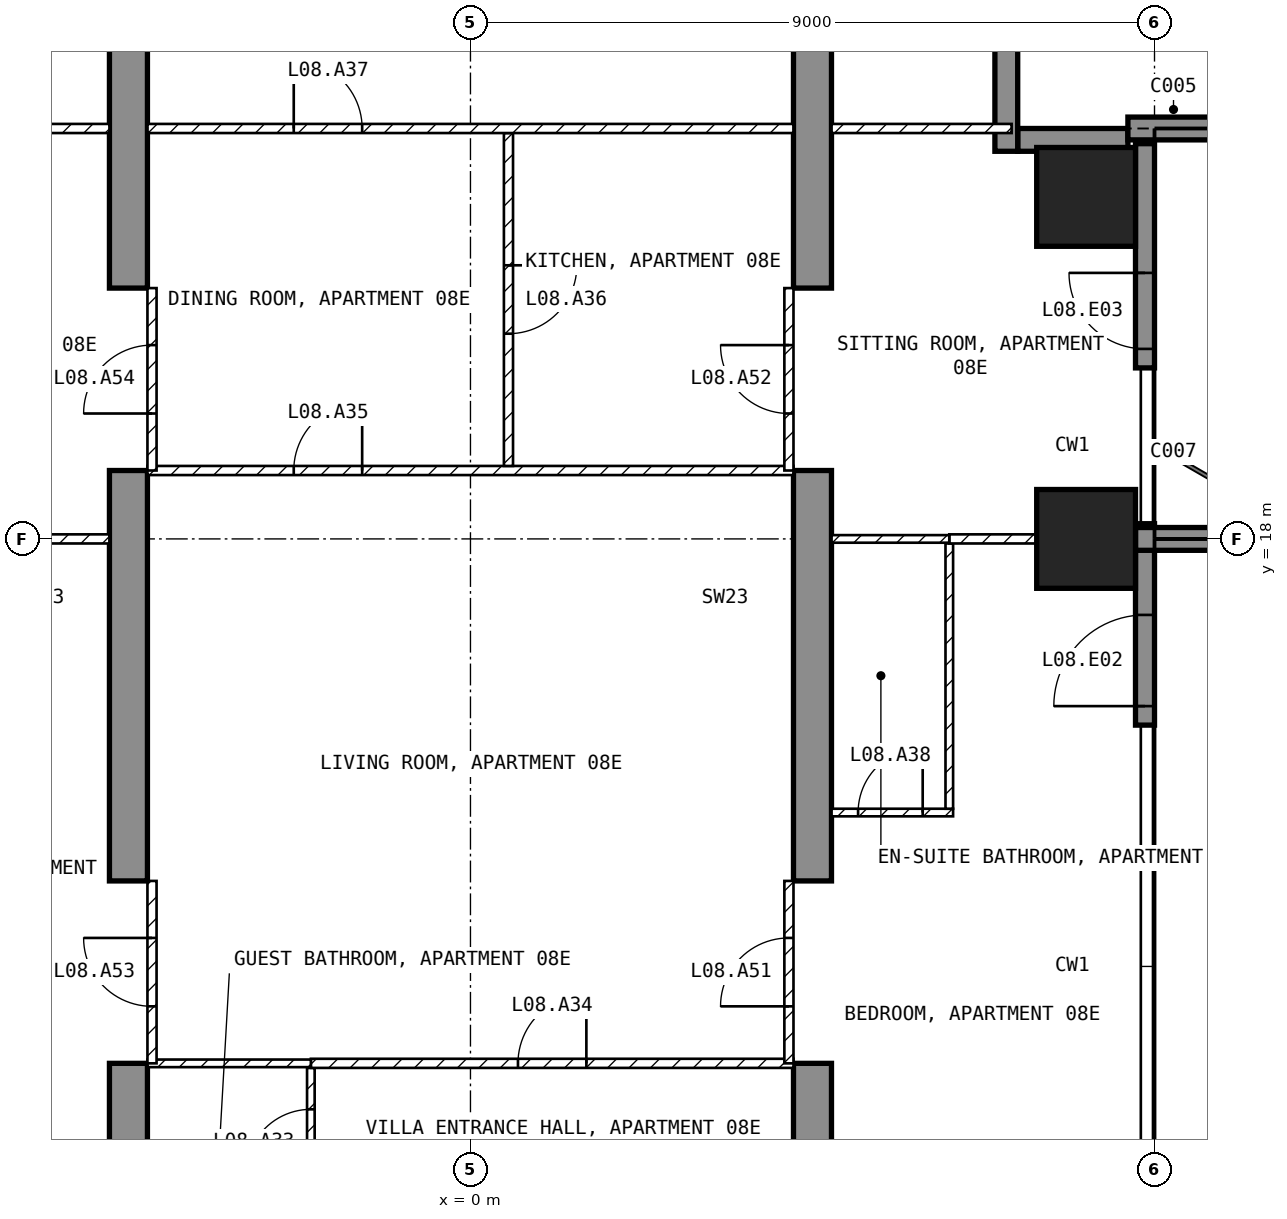
"""IFC4 building model, lengths in metres.
Left out: names, types, materials, properties, quantities, classifications, styles, units other than length and angle.
Written with IfcOpenShell. Run it as: python <this file> out.ifc"""

import sys

from ifc_helpers import new_model, si_unit, direction, frame, frame_2d, origin, origin_2d, place, context, subcontext, project, spatial, polyline, rectangle, outline, extrude, element, fill, save


model = new_model("IFC4")
c1 = context("Model", 3, precision=1e-05, world=origin(), true_north=direction((0.0, 1.0)))
c2 = subcontext(c1, "Body", "Model", "MODEL_VIEW")
j1 = project(units=[si_unit("LENGTHUNIT", "METRE"), si_unit("PLANEANGLEUNIT", "RADIAN")], contexts=[c1])
p1 = place(None, origin())
s1 = spatial("IfcSite", under=j1, at=p1, CompositionType="ELEMENT")
p2 = place(p1, origin())
s2 = spatial("IfcBuilding", under=s1, at=p2, CompositionType="ELEMENT")
p3 = place(p2, frame((0.0, 0.0, 47.0)))
s3 = spatial("IfcBuildingStorey", under=s2, at=p3, CompositionType="ELEMENT", Elevation=47.0)
for number, where, z_axis, x_axis in (
    (1, (8.1, 18.0, -0.25), (0.0, 0.0, 1.0), (1.0, 0.0, 0.0)),
    (2, (8.1, 22.5, -0.25), (0.0, 0.0, 1.0), (1.0, 0.0, 0.0)),
):
    element("IfcColumn", number, at=place(p3, frame(where, z_axis=z_axis, x_axis=x_axis)), inside=s3, PredefinedType="COLUMN", context=c2, shape_type="SweptSolid", body=[
        extrude(rectangle(XDim=1.3, YDim=1.3, at=origin_2d()), origin(), (0.0, 0.0, 1.0), 3.5),
    ])
for number, where, z_axis, x_axis in (
    (3, (-4.75, 9.0, -0.25), (1.0, 0.0, 0.0), (0.0, 1.0, 0.0)),
    (4, (4.25, 9.0, -0.25), (1.0, 0.0, 0.0), (0.0, 1.0, 0.0)),
):
    element("IfcWall", number, at=place(p3, frame(where, z_axis=z_axis, x_axis=x_axis)), inside=s3, PredefinedType="SHEAR", context=c2, shape_type="SweptSolid", body=[
        extrude(outline(polyline([(0.0, 0.0), (2.1, 0.0), (2.1, 2.65), (4.5, 2.65), (4.5, 0.0), (9.9, 0.0), (9.9, 2.65), (12.3, 2.65), (12.3, 0.0), (16.45, 0.0), (16.45, 3.5), (0.0, 3.5), (0.0, 0.0)])), origin(), (0.0, 0.0, 1.0), 0.5),
    ])
p4 = place(p3, frame((8.875, 15.55, 0.0), z_axis=(0.0, 0.0, 1.0), x_axis=(0.0, 1.0, 0.0)))
e5 = element("IfcWall", 5, at=p4, inside=s3, PredefinedType="SOLIDWALL", context=c2, shape_type="SweptSolid", body=[
    extrude(rectangle(XDim=2.65, YDim=0.25, at=frame_2d((1.325, 0.0))), origin(), (0.0, 0.0, 1.0), 3.25),
])
p5 = place(p4, frame((0.25, 0.0, 0.0)))
e6 = element("IfcOpeningElement", 6, at=p5, cuts=e5, PredefinedType="OPENING", context=c2, shape_type="SweptSolid", body=[
    extrude(rectangle(XDim=1.2, YDim=2.4, at=frame_2d((0.6, 1.2))), frame((0.0, 0.135, 0.0), z_axis=(0.0, -1.0, 0.0), x_axis=(1.0, 0.0, 0.0)), (0.0, 0.0, 1.0), 0.27),
])
p6 = place(p3, frame((8.875, 20.25, 0.0), z_axis=(0.0, 0.0, 1.0), x_axis=(0.0, 1.0, 0.0)))
e7 = element("IfcWall", 7, at=p6, inside=s3, PredefinedType="SOLIDWALL", context=c2, shape_type="SweptSolid", body=[
    extrude(rectangle(XDim=2.95, YDim=0.25, at=frame_2d((1.475, 0.0))), origin(), (0.0, 0.0, 1.0), 3.25),
])
p7 = place(p6, frame((0.25, 0.0, 0.0)))
e8 = element("IfcOpeningElement", 8, at=p7, cuts=e7, PredefinedType="OPENING", context=c2, shape_type="SweptSolid", body=[
    extrude(rectangle(XDim=1.0, YDim=2.4, at=frame_2d((0.5, 1.2))), frame((0.0, 0.135, 0.0), z_axis=(0.0, -1.0, 0.0), x_axis=(1.0, 0.0, 0.0)), (0.0, 0.0, 1.0), 0.27),
])
p8 = place(p3, frame((8.65, 23.25, 0.0), z_axis=(0.0, 0.0, 1.0), x_axis=(-1.0, 0.0, 0.0)))
e9 = element("IfcWall", 9, at=p8, inside=s3, PredefinedType="SOLIDWALL", context=c2, shape_type="SweptSolid", body=[
    extrude(rectangle(XDim=1.45, YDim=0.3, at=frame_2d((0.725, 0.0))), origin(), (0.0, 0.0, 1.0), 3.25),
])
p9 = place(p3, frame((7.05, 23.1, 0.0), z_axis=(0.0, 0.0, 1.0), x_axis=(0.0, 1.0, 0.0)))
e10 = element("IfcWall", 10, at=p9, inside=s3, PredefinedType="SOLIDWALL", context=c2, shape_type="SweptSolid", body=[
    extrude(rectangle(XDim=1.8, YDim=0.3, at=frame_2d((0.9, 0.0))), origin(), (0.0, 0.0, 1.0), 3.25),
])
p10 = place(p3, frame((8.75, 18.0, 0.0), z_axis=(0.0, 0.0, 1.0), x_axis=(1.0, 0.0, 0.0)))
e11 = element("IfcWall", 11, at=p10, inside=s3, PredefinedType="SOLIDWALL", context=c2, shape_type="SweptSolid", body=[
    extrude(rectangle(XDim=2.95, YDim=0.3, at=frame_2d((1.475, 0.0))), origin(), (0.0, 0.0, 1.0), 3.25),
])
p11 = place(p3, frame((8.65, 23.4, 0.0), z_axis=(0.0, 0.0, 1.0), x_axis=(1.0, 0.0, 0.0)))
e12 = element("IfcWall", 12, at=p11, inside=s3, PredefinedType="SOLIDWALL", context=c2, shape_type="SweptSolid", body=[
    extrude(rectangle(XDim=3.05, YDim=0.3, at=frame_2d((1.525, 0.0))), origin(), (0.0, 0.0, 1.0), 3.25),
])
p12 = place(p3, frame((-2.1, 9.1, 0.0), z_axis=(0.0, 0.0, 1.0), x_axis=(0.0, 1.0, 0.0)))
e13 = element("IfcWall", 13, at=p12, inside=s3, PredefinedType="PARTITIONING", context=c2, shape_type="SweptSolid", body=[
    extrude(rectangle(XDim=1.94, YDim=0.1, at=frame_2d((0.97, 0.0))), origin(), (0.0, 0.0, 1.0), 3.25),
])
p13 = place(p12, frame((0.545, 0.0, 0.0)))
e14 = element("IfcOpeningElement", 14, at=p13, cuts=e13, PredefinedType="OPENING", context=c2, shape_type="SweptSolid", body=[
    extrude(rectangle(XDim=0.85, YDim=2.1, at=frame_2d((0.425, 1.05))), frame((0.0, 0.06, 0.0), z_axis=(0.0, -1.0, 0.0), x_axis=(1.0, 0.0, 0.0)), (0.0, 0.0, 1.0), 0.12),
])
p14 = place(p3, frame((-2.1, 11.1, 0.0), z_axis=(0.0, 0.0, 1.0), x_axis=(1.0, 0.0, 0.0)))
e15 = element("IfcWall", 15, at=p14, inside=s3, PredefinedType="PARTITIONING", context=c2, shape_type="SweptSolid", body=[
    extrude(rectangle(XDim=6.35, YDim=0.12, at=frame_2d((3.175, 0.0))), origin(), (0.0, 0.0, 1.0), 3.25),
])
p15 = place(p14, frame((2.725, 0.0, 0.0)))
e16 = element("IfcOpeningElement", 16, at=p15, cuts=e15, PredefinedType="OPENING", context=c2, shape_type="SweptSolid", body=[
    extrude(rectangle(XDim=0.9, YDim=2.1, at=frame_2d((0.45, 1.05))), frame((0.0, 0.07, 0.0), z_axis=(0.0, -1.0, 0.0), x_axis=(1.0, 0.0, 0.0)), (0.0, 0.0, 1.0), 0.14),
])
p16 = place(p3, frame((-4.25, 11.1, 0.0), z_axis=(0.0, 0.0, 1.0), x_axis=(1.0, 0.0, 0.0)))
e17 = element("IfcWall", 17, at=p16, inside=s3, PredefinedType="PARTITIONING", context=c2, shape_type="SweptSolid", body=[
    extrude(rectangle(XDim=2.15, YDim=0.1, at=frame_2d((1.075, 0.0))), origin(), (0.0, 0.0, 1.0), 3.25),
])
p17 = place(p3, frame((-4.25, 18.9, 0.0), z_axis=(0.0, 0.0, 1.0), x_axis=(1.0, 0.0, 0.0)))
e18 = element("IfcWall", 18, at=p17, inside=s3, PredefinedType="PARTITIONING", context=c2, shape_type="SweptSolid", body=[
    extrude(rectangle(XDim=8.5, YDim=0.12, at=frame_2d((4.25, 0.0))), origin(), (0.0, 0.0, 1.0), 3.25),
])
p18 = place(p17, frame((1.925, 0.0, 0.0)))
e19 = element("IfcOpeningElement", 19, at=p18, cuts=e18, PredefinedType="OPENING", context=c2, shape_type="SweptSolid", body=[
    extrude(rectangle(XDim=0.9, YDim=2.1, at=frame_2d((0.45, 1.05))), frame((0.0, 0.07, 0.0), z_axis=(0.0, -1.0, 0.0), x_axis=(1.0, 0.0, 0.0)), (0.0, 0.0, 1.0), 0.14),
])
p19 = place(p3, frame((0.5, 23.34, 0.0), z_axis=(0.0, 0.0, 1.0), x_axis=(0.0, -1.0, 0.0)))
e20 = element("IfcWall", 20, at=p19, inside=s3, PredefinedType="PARTITIONING", context=c2, shape_type="SweptSolid", body=[
    extrude(rectangle(XDim=4.38, YDim=0.12, at=frame_2d((2.19, 0.0))), origin(), (0.0, 0.0, 1.0), 3.25),
])
p20 = place(p19, frame((1.74, 0.0, 0.0)))
e21 = element("IfcOpeningElement", 21, at=p20, cuts=e20, PredefinedType="OPENING", context=c2, shape_type="SweptSolid", body=[
    extrude(rectangle(XDim=0.9, YDim=2.1, at=frame_2d((0.45, 1.05))), frame((0.0, 0.07, 0.0), z_axis=(0.0, -1.0, 0.0), x_axis=(1.0, 0.0, 0.0)), (0.0, 0.0, 1.0), 0.14),
])
p21 = place(p3, frame((-4.25, 23.4, 0.0), z_axis=(0.0, 0.0, 1.0), x_axis=(1.0, 0.0, 0.0)))
e22 = element("IfcWall", 22, at=p21, inside=s3, PredefinedType="PARTITIONING", context=c2, shape_type="SweptSolid", body=[
    extrude(rectangle(XDim=8.5, YDim=0.12, at=frame_2d((4.25, 0.0))), origin(), (0.0, 0.0, 1.0), 3.25),
])
p22 = place(p21, frame((1.925, 0.0, 0.0)))
e23 = element("IfcOpeningElement", 23, at=p22, cuts=e22, PredefinedType="OPENING", context=c2, shape_type="SweptSolid", body=[
    extrude(rectangle(XDim=0.9, YDim=2.1, at=frame_2d((0.45, 1.05))), frame((0.0, 0.07, 0.0), z_axis=(0.0, -1.0, 0.0), x_axis=(1.0, 0.0, 0.0)), (0.0, 0.0, 1.0), 0.14),
])
p23 = place(p3, frame((4.75, 14.4, 0.0), z_axis=(0.0, 0.0, 1.0), x_axis=(1.0, 0.0, 0.0)))
e24 = element("IfcWall", 24, at=p23, inside=s3, PredefinedType="PARTITIONING", context=c2, shape_type="SweptSolid", body=[
    extrude(rectangle(XDim=1.6, YDim=0.1, at=frame_2d((0.8, 0.0))), origin(), (0.0, 0.0, 1.0), 3.25),
])
p24 = place(p23, frame((0.35, 0.0, 0.0)))
e25 = element("IfcOpeningElement", 25, at=p24, cuts=e24, PredefinedType="OPENING", context=c2, shape_type="SweptSolid", body=[
    extrude(rectangle(XDim=0.85, YDim=2.1, at=frame_2d((0.425, 1.05))), frame((0.0, 0.06, 0.0), z_axis=(0.0, -1.0, 0.0), x_axis=(1.0, 0.0, 0.0)), (0.0, 0.0, 1.0), 0.12),
])
p25 = place(p3, frame((6.3, 14.45, 0.0), z_axis=(0.0, 0.0, 1.0), x_axis=(0.0, 1.0, 0.0)))
e26 = element("IfcWall", 26, at=p25, inside=s3, PredefinedType="PARTITIONING", context=c2, shape_type="SweptSolid", body=[
    extrude(rectangle(XDim=3.49, YDim=0.1, at=frame_2d((1.745, 0.0))), origin(), (0.0, 0.0, 1.0), 3.25),
])
p26 = place(p3, frame((6.3, 18.0, 0.0), z_axis=(0.0, 0.0, 1.0), x_axis=(1.0, 0.0, 0.0)))
e27 = element("IfcWall", 27, at=p26, inside=s3, PredefinedType="PARTITIONING", context=c2, shape_type="SweptSolid", body=[
    extrude(rectangle(XDim=1.15, YDim=0.12, at=frame_2d((0.575, 0.0))), origin(), (0.0, 0.0, 1.0), 2.346),
])
p27 = place(p3, frame((4.75, 18.0, 0.0), z_axis=(0.0, 0.0, 1.0), x_axis=(1.0, 0.0, 0.0)))
e28 = element("IfcWall", 28, at=p27, inside=s3, PredefinedType="PARTITIONING", context=c2, shape_type="SweptSolid", body=[
    extrude(rectangle(XDim=1.55, YDim=0.1, at=frame_2d((0.775, 0.0))), origin(), (0.0, 0.0, 1.0), 2.346),
])
p28 = place(p3, frame((4.75, 23.4, 0.0), z_axis=(0.0, 0.0, 1.0), x_axis=(1.0, 0.0, 0.0)))
e29 = element("IfcWall", 29, at=p28, inside=s3, PredefinedType="PARTITIONING", context=c2, shape_type="SweptSolid", body=[
    extrude(rectangle(XDim=2.37, YDim=0.12, at=frame_2d((1.185, 0.0))), origin(), (0.0, 0.0, 1.0), 3.25),
])
p29 = place(p3, frame((-7.45, 18.0, 0.0), z_axis=(0.0, 0.0, 1.0), x_axis=(1.0, 0.0, 0.0)))
e30 = element("IfcWall", 30, at=p29, inside=s3, PredefinedType="PARTITIONING", context=c2, shape_type="SweptSolid", body=[
    extrude(rectangle(XDim=2.7, YDim=0.12, at=frame_2d((1.35, 0.0))), origin(), (0.0, 0.0, 1.0), 2.346),
])
p30 = place(p3, frame((-7.12, 23.4, 0.0), z_axis=(0.0, 0.0, 1.0), x_axis=(1.0, 0.0, 0.0)))
e31 = element("IfcWall", 31, at=p30, inside=s3, PredefinedType="PARTITIONING", context=c2, shape_type="SweptSolid", body=[
    extrude(rectangle(XDim=2.37, YDim=0.12, at=frame_2d((1.185, 0.0))), origin(), (0.0, 0.0, 1.0), 3.25),
])
p31 = place(p3, frame((4.19, 11.1, 0.0), z_axis=(0.0, 0.0, 1.0), x_axis=(0.0, 1.0, 0.0)))
e32 = element("IfcWall", 32, at=p31, inside=s3, PredefinedType="PARTITIONING", context=c2, shape_type="SweptSolid", body=[
    extrude(rectangle(XDim=2.4, YDim=0.12, at=frame_2d((1.2, 0.0))), origin(), (0.0, 0.0, 1.0), 2.4),
])
p32 = place(p31, frame((0.75, 0.0, 0.0)))
e33 = element("IfcOpeningElement", 33, at=p32, cuts=e32, PredefinedType="OPENING", context=c2, shape_type="SweptSolid", body=[
    extrude(rectangle(XDim=0.9, YDim=2.1, at=frame_2d((0.45, 1.05))), frame((0.0, 0.07, 0.0), z_axis=(0.0, -1.0, 0.0), x_axis=(1.0, 0.0, 0.0)), (0.0, 0.0, 1.0), 0.14),
])
p33 = place(p3, frame((4.19, 18.9, 0.0), z_axis=(0.0, 0.0, 1.0), x_axis=(0.0, 1.0, 0.0)))
e34 = element("IfcWall", 34, at=p33, inside=s3, PredefinedType="PARTITIONING", context=c2, shape_type="SweptSolid", body=[
    extrude(rectangle(XDim=2.4, YDim=0.12, at=frame_2d((1.2, 0.0))), origin(), (0.0, 0.0, 1.0), 2.4),
])
p34 = place(p33, frame((0.75, 0.0, 0.0)))
e35 = element("IfcOpeningElement", 35, at=p34, cuts=e34, PredefinedType="OPENING", context=c2, shape_type="SweptSolid", body=[
    extrude(rectangle(XDim=0.9, YDim=2.1, at=frame_2d((0.45, 1.05))), frame((0.0, 0.07, 0.0), z_axis=(0.0, -1.0, 0.0), x_axis=(1.0, 0.0, 0.0)), (0.0, 0.0, 1.0), 0.14),
])
p35 = place(p3, frame((-4.19, 11.1, 0.0), z_axis=(0.0, 0.0, 1.0), x_axis=(0.0, 1.0, 0.0)))
e36 = element("IfcWall", 36, at=p35, inside=s3, PredefinedType="PARTITIONING", context=c2, shape_type="SweptSolid", body=[
    extrude(rectangle(XDim=2.4, YDim=0.12, at=frame_2d((1.2, 0.0))), origin(), (0.0, 0.0, 1.0), 2.4),
])
p36 = place(p35, frame((0.75, 0.0, 0.0)))
e37 = element("IfcOpeningElement", 37, at=p36, cuts=e36, PredefinedType="OPENING", context=c2, shape_type="SweptSolid", body=[
    extrude(rectangle(XDim=0.9, YDim=2.1, at=frame_2d((0.45, 1.05))), frame((0.0, 0.07, 0.0), z_axis=(0.0, -1.0, 0.0), x_axis=(1.0, 0.0, 0.0)), (0.0, 0.0, 1.0), 0.14),
])
p37 = place(p3, frame((-4.19, 18.9, 0.0), z_axis=(0.0, 0.0, 1.0), x_axis=(0.0, 1.0, 0.0)))
e38 = element("IfcWall", 38, at=p37, inside=s3, PredefinedType="PARTITIONING", context=c2, shape_type="SweptSolid", body=[
    extrude(rectangle(XDim=2.4, YDim=0.12, at=frame_2d((1.2, 0.0))), origin(), (0.0, 0.0, 1.0), 2.4),
])
p38 = place(p37, frame((0.75, 0.0, 0.0)))
e39 = element("IfcOpeningElement", 39, at=p38, cuts=e38, PredefinedType="OPENING", context=c2, shape_type="SweptSolid", body=[
    extrude(rectangle(XDim=0.9, YDim=2.1, at=frame_2d((0.45, 1.05))), frame((0.0, 0.07, 0.0), z_axis=(0.0, -1.0, 0.0), x_axis=(1.0, 0.0, 0.0)), (0.0, 0.0, 1.0), 0.14),
])
p39 = place(p5, origin())
e40 = element("IfcDoor", 40, at=p39, inside=s3, OperationType="SINGLE_SWING_LEFT", PredefinedType="DOOR", context=c2, shape_type="SweptSolid", body=[
    extrude(rectangle(XDim=1.2, YDim=2.4, at=frame_2d((0.6, 1.2))), frame((0.0, 0.025, 0.0), z_axis=(0.0, -1.0, 0.0), x_axis=(1.0, 0.0, 0.0)), (0.0, 0.0, 1.0), 0.05),
])
fill(e6, e40)
p40 = place(p7, origin())
e41 = element("IfcDoor", 41, at=p40, inside=s3, OperationType="SINGLE_SWING_RIGHT", PredefinedType="DOOR", context=c2, shape_type="SweptSolid", body=[
    extrude(rectangle(XDim=1.0, YDim=2.4, at=frame_2d((0.5, 1.2))), frame((0.0, 0.025, 0.0), z_axis=(0.0, -1.0, 0.0), x_axis=(1.0, 0.0, 0.0)), (0.0, 0.0, 1.0), 0.05),
])
fill(e8, e41)
p41 = place(p13, origin())
e42 = element("IfcDoor", 42, at=p41, inside=s3, OperationType="SINGLE_SWING_LEFT", PredefinedType="DOOR", context=c2, shape_type="SweptSolid", body=[
    extrude(rectangle(XDim=0.85, YDim=2.1, at=frame_2d((0.425, 1.05))), frame((0.0, 0.025, 0.0), z_axis=(0.0, -1.0, 0.0), x_axis=(1.0, 0.0, 0.0)), (0.0, 0.0, 1.0), 0.05),
])
fill(e14, e42)
p42 = place(p15, origin())
e43 = element("IfcDoor", 43, at=p42, inside=s3, OperationType="SINGLE_SWING_RIGHT", PredefinedType="DOOR", context=c2, shape_type="SweptSolid", body=[
    extrude(rectangle(XDim=0.9, YDim=2.1, at=frame_2d((0.45, 1.05))), frame((0.0, 0.025, 0.0), z_axis=(0.0, -1.0, 0.0), x_axis=(1.0, 0.0, 0.0)), (0.0, 0.0, 1.0), 0.05),
])
fill(e16, e43)
p43 = place(p18, origin())
e44 = element("IfcDoor", 44, at=p43, inside=s3, OperationType="SINGLE_SWING_RIGHT", PredefinedType="DOOR", context=c2, shape_type="SweptSolid", body=[
    extrude(rectangle(XDim=0.9, YDim=2.1, at=frame_2d((0.45, 1.05))), frame((0.0, 0.025, 0.0), z_axis=(0.0, -1.0, 0.0), x_axis=(1.0, 0.0, 0.0)), (0.0, 0.0, 1.0), 0.05),
])
fill(e19, e44)
p44 = place(p20, origin())
e45 = element("IfcDoor", 45, at=p44, inside=s3, OperationType="SINGLE_SWING_LEFT", PredefinedType="DOOR", context=c2, shape_type="SweptSolid", body=[
    extrude(rectangle(XDim=0.9, YDim=2.1, at=frame_2d((0.45, 1.05))), frame((0.0, 0.025, 0.0), z_axis=(0.0, -1.0, 0.0), x_axis=(1.0, 0.0, 0.0)), (0.0, 0.0, 1.0), 0.05),
])
fill(e21, e45)
p45 = place(p22, origin())
e46 = element("IfcDoor", 46, at=p45, inside=s3, OperationType="SINGLE_SWING_LEFT", PredefinedType="DOOR", context=c2, shape_type="SweptSolid", body=[
    extrude(rectangle(XDim=0.9, YDim=2.1, at=frame_2d((0.45, 1.05))), frame((0.0, 0.025, 0.0), z_axis=(0.0, -1.0, 0.0), x_axis=(1.0, 0.0, 0.0)), (0.0, 0.0, 1.0), 0.05),
])
fill(e23, e46)
p46 = place(p24, origin())
e47 = element("IfcDoor", 47, at=p46, inside=s3, OperationType="SINGLE_SWING_RIGHT", PredefinedType="DOOR", context=c2, shape_type="SweptSolid", body=[
    extrude(rectangle(XDim=0.85, YDim=2.1, at=frame_2d((0.425, 1.05))), frame((0.0, 0.025, 0.0), z_axis=(0.0, -1.0, 0.0), x_axis=(1.0, 0.0, 0.0)), (0.0, 0.0, 1.0), 0.05),
])
fill(e25, e47)
p47 = place(p32, origin())
e48 = element("IfcDoor", 48, at=p47, inside=s3, OperationType="SINGLE_SWING_LEFT", PredefinedType="DOOR", context=c2, shape_type="SweptSolid", body=[
    extrude(rectangle(XDim=0.9, YDim=2.1, at=frame_2d((0.45, 1.05))), frame((0.0, 0.025, 0.0), z_axis=(0.0, -1.0, 0.0), x_axis=(1.0, 0.0, 0.0)), (0.0, 0.0, 1.0), 0.05),
])
fill(e33, e48)
p48 = place(p34, origin())
e49 = element("IfcDoor", 49, at=p48, inside=s3, OperationType="SINGLE_SWING_RIGHT", PredefinedType="DOOR", context=c2, shape_type="SweptSolid", body=[
    extrude(rectangle(XDim=0.9, YDim=2.1, at=frame_2d((0.45, 1.05))), frame((0.0, 0.025, 0.0), z_axis=(0.0, -1.0, 0.0), x_axis=(1.0, 0.0, 0.0)), (0.0, 0.0, 1.0), 0.05),
])
fill(e35, e49)
p49 = place(p36, origin())
e50 = element("IfcDoor", 50, at=p49, inside=s3, OperationType="SINGLE_SWING_RIGHT", PredefinedType="DOOR", context=c2, shape_type="SweptSolid", body=[
    extrude(rectangle(XDim=0.9, YDim=2.1, at=frame_2d((0.45, 1.05))), frame((0.0, 0.025, 0.0), z_axis=(0.0, -1.0, 0.0), x_axis=(1.0, 0.0, 0.0)), (0.0, 0.0, 1.0), 0.05),
])
fill(e37, e50)
p50 = place(p38, origin())
e51 = element("IfcDoor", 51, at=p50, inside=s3, OperationType="SINGLE_SWING_LEFT", PredefinedType="DOOR", context=c2, shape_type="SweptSolid", body=[
    extrude(rectangle(XDim=0.9, YDim=2.1, at=frame_2d((0.45, 1.05))), frame((0.0, 0.025, 0.0), z_axis=(0.0, -1.0, 0.0), x_axis=(1.0, 0.0, 0.0)), (0.0, 0.0, 1.0), 0.05),
])
fill(e39, e51)
save(model, sys.argv[1])
